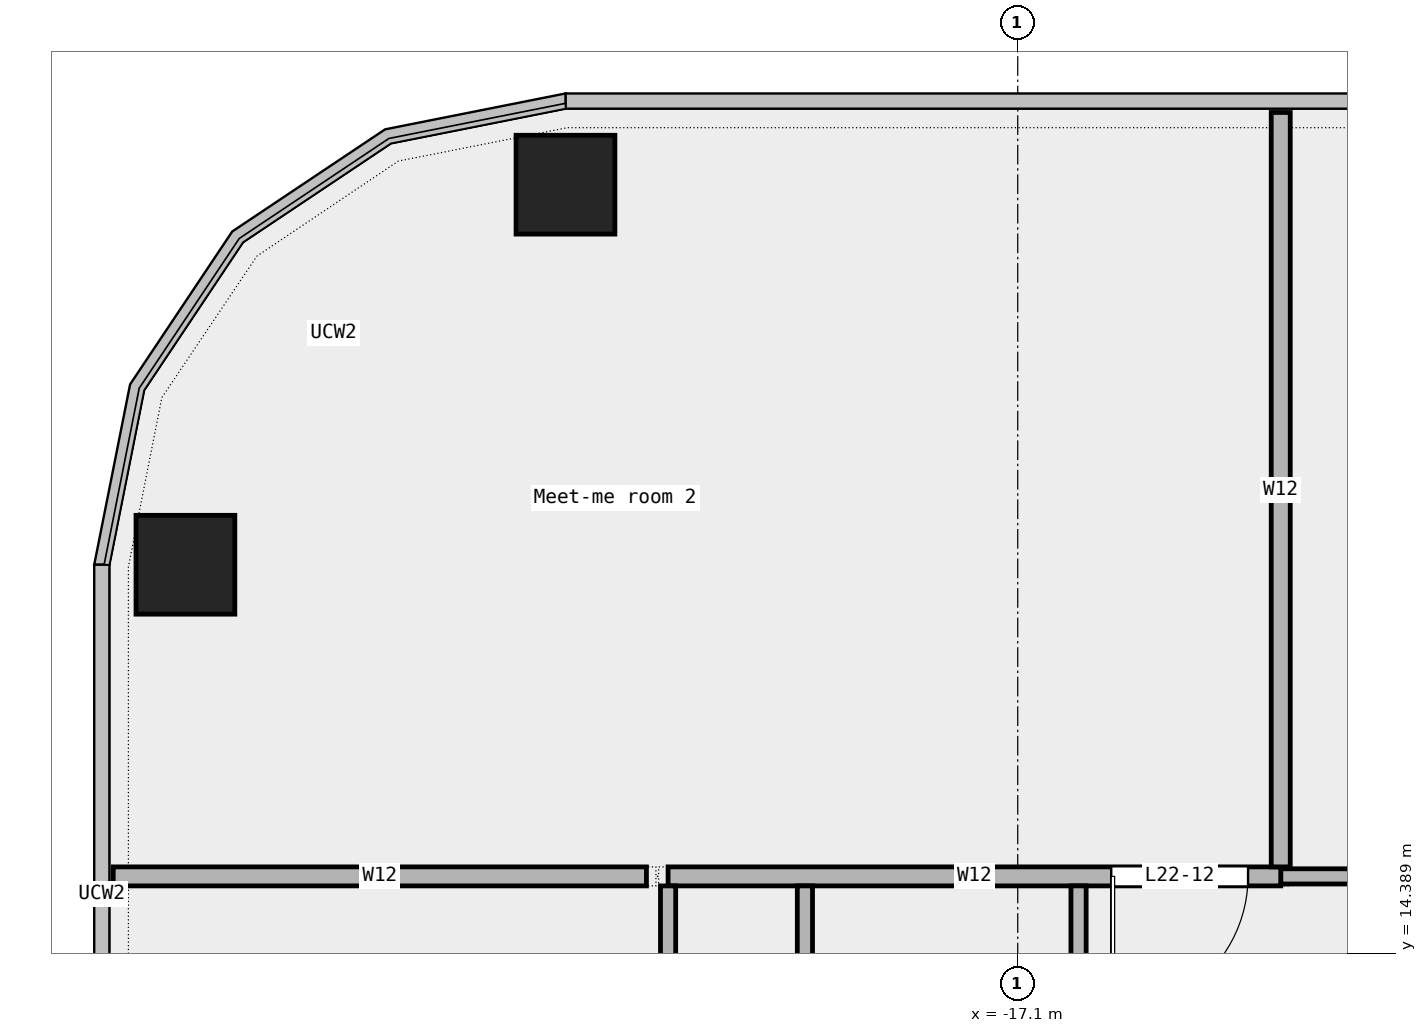
"""IFC4 building model, lengths in metres.
Left out: names, types, materials, properties, quantities, classifications, styles, units other than length and angle.
Written with IfcOpenShell. Run it as: python <this file> out.ifc"""

import sys

from ifc_helpers import new_model, si_unit, direction, frame, frame_2d, origin, origin_2d, place, context, subcontext, project, spatial, rectangle, extrude, element, fill, save


model = new_model("IFC4")
c1 = context("Model", 3, precision=1e-05, world=origin(), true_north=direction((0.0, 1.0)))
c2 = subcontext(c1, "Body", "Model", "MODEL_VIEW")
j1 = project(units=[si_unit("LENGTHUNIT", "METRE"), si_unit("PLANEANGLEUNIT", "RADIAN")], contexts=[c1])
p1 = place(None, origin())
s1 = spatial("IfcSite", under=j1, at=p1, CompositionType="ELEMENT")
p2 = place(p1, origin())
s2 = spatial("IfcBuilding", under=s1, at=p2, CompositionType="ELEMENT")
p3 = place(p2, frame((0.0, 0.0, 112.6)))
s3 = spatial("IfcBuildingStorey", under=s2, at=p3, CompositionType="ELEMENT", Elevation=112.6)
for number, where, z_axis, x_axis in (
    (1, (-23.05, 24.5, 0.0), (0.0, 0.0, 1.0), (1.0, 0.0, 0.0)),
    (2, (-28.05, 19.5, 0.0), (0.0, 0.0, 1.0), (1.0, 0.0, 0.0)),
):
    element("IfcColumn", number, at=place(p3, frame(where, z_axis=z_axis, x_axis=x_axis)), inside=s3, PredefinedType="COLUMN", context=c2, shape_type="SweptSolid", body=[
        extrude(rectangle(XDim=1.3, YDim=1.3, at=origin_2d()), origin(), (0.0, 0.0, 1.0), 4.05),
    ])
p4 = place(p3, frame((-13.64, 15.4, 0.0), z_axis=(0.0, 0.0, 1.0), x_axis=(1.0, 0.0, 0.0)))
e3 = element("IfcWall", 3, at=p4, inside=s3, PredefinedType="PARTITIONING", context=c2, shape_type="SweptSolid", body=[
    extrude(rectangle(XDim=12.125, YDim=0.2, at=frame_2d((6.062, 0.0))), origin(), (0.0, 0.0, 1.0), 4.05),
])
p5 = place(p4, frame((5.312, 0.0, 0.0)))
e4 = element("IfcOpeningElement", 4, at=p5, cuts=e3, PredefinedType="OPENING", context=c2, shape_type="SweptSolid", body=[
    extrude(rectangle(XDim=1.5, YDim=2.1, at=frame_2d((0.75, 1.05))), frame((0.0, 0.112, 0.0), z_axis=(0.0, -1.0, 0.0), x_axis=(1.0, 0.0, 0.0)), (0.0, 0.0, 1.0), 0.224),
])
p6 = place(p3, frame((-29.0, 15.4, 0.0), z_axis=(0.0, 0.0, 1.0), x_axis=(1.0, 0.0, 0.0)))
e5 = element("IfcWall", 5, at=p6, inside=s3, PredefinedType="PARTITIONING", context=c2, shape_type="SweptSolid", body=[
    extrude(rectangle(XDim=7.015, YDim=0.25, at=frame_2d((3.507, 0.0))), origin(), (0.0, 0.0, 1.0), 4.05),
])
p7 = place(p3, frame((-21.7, 15.4, 0.0), z_axis=(0.0, 0.0, 1.0), x_axis=(1.0, 0.0, 0.0)))
e6 = element("IfcWall", 6, at=p7, inside=s3, PredefinedType="PARTITIONING", context=c2, shape_type="SweptSolid", body=[
    extrude(rectangle(XDim=8.06, YDim=0.25, at=frame_2d((4.03, 0.0))), origin(), (0.0, 0.0, 1.0), 4.05),
])
p8 = place(p7, frame((5.83, 0.0, 0.0)))
e7 = element("IfcOpeningElement", 7, at=p8, cuts=e6, PredefinedType="OPENING", context=c2, shape_type="SweptSolid", body=[
    extrude(rectangle(XDim=1.8, YDim=2.1, at=frame_2d((0.9, 1.05))), frame((0.0, 0.137, 0.0), z_axis=(0.0, -1.0, 0.0), x_axis=(1.0, 0.0, 0.0)), (0.0, 0.0, 1.0), 0.274),
])
p9 = place(p3, frame((-21.7, -8.975, 0.0), z_axis=(0.0, 0.0, 1.0), x_axis=(0.0, 1.0, 0.0)))
e8 = element("IfcWall", 8, at=p9, inside=s3, PredefinedType="PARTITIONING", context=c2, shape_type="SweptSolid", body=[
    extrude(rectangle(XDim=24.25, YDim=0.2, at=frame_2d((12.125, 0.0))), origin(), (0.0, 0.0, 1.0), 4.05),
])
p10 = place(p9, frame((2.805, 0.0, 0.0)))
e9 = element("IfcOpeningElement", 9, at=p10, cuts=e8, PredefinedType="OPENING", context=c2, shape_type="SweptSolid", body=[
    extrude(rectangle(XDim=1.2, YDim=2.1, at=frame_2d((0.6, 1.05))), frame((0.0, 0.112, 0.0), z_axis=(0.0, -1.0, 0.0), x_axis=(1.0, 0.0, 0.0)), (0.0, 0.0, 1.0), 0.224),
])
p11 = place(p9, frame((21.58, 0.0, 0.0)))
e10 = element("IfcOpeningElement", 10, at=p11, cuts=e8, PredefinedType="OPENING", context=c2, shape_type="SweptSolid", body=[
    extrude(rectangle(XDim=0.9, YDim=2.1, at=frame_2d((0.45, 1.05))), frame((0.0, 0.112, 0.0), z_axis=(0.0, -1.0, 0.0), x_axis=(1.0, 0.0, 0.0)), (0.0, 0.0, 1.0), 0.224),
])
p12 = place(p9, frame((12.71, 0.0, 0.0)))
e11 = element("IfcOpeningElement", 11, at=p12, cuts=e8, PredefinedType="OPENING", context=c2, shape_type="SweptSolid", body=[
    extrude(rectangle(XDim=1.2, YDim=2.1, at=frame_2d((0.6, 1.05))), frame((0.0, 0.112, 0.0), z_axis=(0.0, -1.0, 0.0), x_axis=(1.0, 0.0, 0.0)), (0.0, 0.0, 1.0), 0.224),
])
p13 = place(p3, frame((-19.9, 9.85, 0.0), z_axis=(0.0, 0.0, 1.0), x_axis=(0.0, 1.0, 0.0)))
e12 = element("IfcWall", 12, at=p13, inside=s3, PredefinedType="PARTITIONING", context=c2, shape_type="SweptSolid", body=[
    extrude(rectangle(XDim=5.425, YDim=0.2, at=frame_2d((2.712, 0.0))), origin(), (0.0, 0.0, 1.0), 4.05),
])
p14 = place(p3, frame((-16.3, 11.75, 0.0), z_axis=(0.0, 0.0, 1.0), x_axis=(0.0, 1.0, 0.0)))
e13 = element("IfcWall", 13, at=p14, inside=s3, PredefinedType="PARTITIONING", context=c2, shape_type="SweptSolid", body=[
    extrude(rectangle(XDim=3.525, YDim=0.2, at=frame_2d((1.762, 0.0))), origin(), (0.0, 0.0, 1.0), 4.05),
])
p15 = place(p14, frame((1.312, 0.0, 0.0)))
e14 = element("IfcOpeningElement", 14, at=p15, cuts=e13, PredefinedType="OPENING", context=c2, shape_type="SweptSolid", body=[
    extrude(rectangle(XDim=0.9, YDim=2.1, at=frame_2d((0.45, 1.05))), frame((0.0, 0.112, 0.0), z_axis=(0.0, -1.0, 0.0), x_axis=(1.0, 0.0, 0.0)), (0.0, 0.0, 1.0), 0.224),
])
p16 = place(p3, frame((-13.64, 15.525, 0.0), z_axis=(0.0, 0.0, 1.0), x_axis=(0.0, 1.0, 0.0)))
e15 = element("IfcWall", 15, at=p16, inside=s3, PredefinedType="PARTITIONING", context=c2, shape_type="SweptSolid", body=[
    extrude(rectangle(XDim=9.925, YDim=0.25, at=frame_2d((4.962, 0.0))), origin(), (0.0, 0.0, 1.0), 4.05),
])
p17 = place(p8, origin())
e16 = element("IfcDoor", 16, at=p17, inside=s3, OperationType="DOUBLE_DOOR_SINGLE_SWING", PredefinedType="DOOR", context=c2, shape_type="SweptSolid", body=[
    extrude(rectangle(XDim=1.8, YDim=2.1, at=frame_2d((0.9, 1.05))), frame((0.0, 0.025, 0.0), z_axis=(0.0, -1.0, 0.0), x_axis=(1.0, 0.0, 0.0)), (0.0, 0.0, 1.0), 0.05),
])
fill(e7, e16)
save(model, sys.argv[1])
